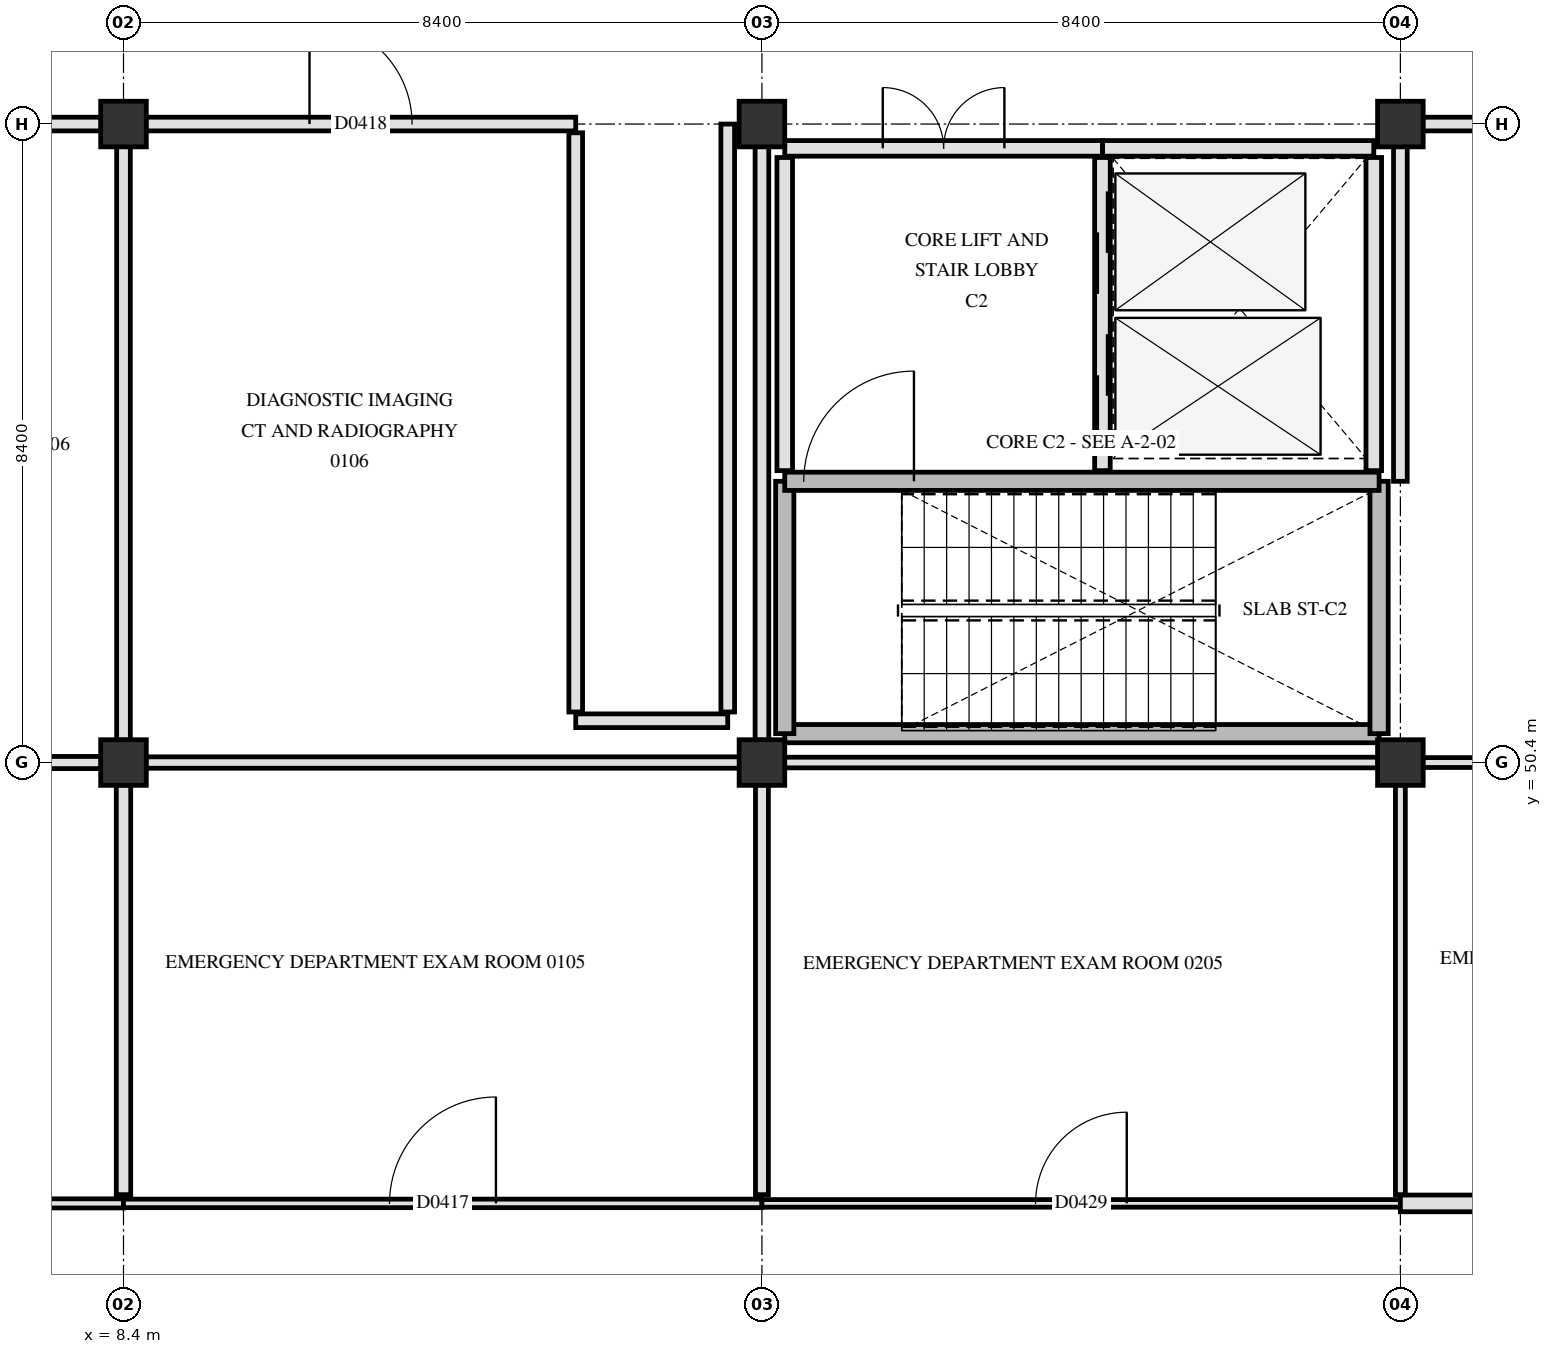
"""IFC4 building model, lengths in metres.
Left out: names, types, materials, properties, quantities, classifications, styles, units other than length and angle.
Written with IfcOpenShell. Run it as: python <this file> out.ifc"""

import sys

from ifc_helpers import new_model, si_unit, direction, frame, frame_2d, origin, origin_2d, place, context, subcontext, project, spatial, rectangle, extrude, element, fill, save


model = new_model("IFC4")
c1 = context("Model", 3, precision=1e-05, world=origin(), true_north=direction((0.0, 1.0)))
c2 = subcontext(c1, "Body", "Model", "MODEL_VIEW")
j1 = project(units=[si_unit("LENGTHUNIT", "METRE"), si_unit("PLANEANGLEUNIT", "RADIAN")], contexts=[c1])
p1 = place(None, origin())
s1 = spatial("IfcSite", under=j1, at=p1, CompositionType="ELEMENT")
p2 = place(p1, origin())
s2 = spatial("IfcBuilding", under=s1, at=p2, CompositionType="ELEMENT")
p3 = place(p2, origin())
s3 = spatial("IfcBuildingStorey", under=s2, at=p3, CompositionType="ELEMENT", Elevation=0.0)
for number, where, z_axis, x_axis in (
    (1, (8.4, 50.4, 0.0), (0.0, 0.0, 1.0), (1.0, 0.0, 0.0)),
    (2, (8.4, 58.8, 0.0), (0.0, 0.0, 1.0), (1.0, 0.0, 0.0)),
    (3, (16.8, 50.4, 0.0), (0.0, 0.0, 1.0), (1.0, 0.0, 0.0)),
    (4, (16.8, 58.8, 0.0), (0.0, 0.0, 1.0), (1.0, 0.0, 0.0)),
    (5, (25.2, 50.4, 0.0), (0.0, 0.0, 1.0), (1.0, 0.0, 0.0)),
    (6, (25.2, 58.8, 0.0), (0.0, 0.0, 1.0), (1.0, 0.0, 0.0)),
):
    element("IfcColumn", number, at=place(p3, frame(where, z_axis=z_axis, x_axis=x_axis)), inside=s3, PredefinedType="COLUMN", context=c2, shape_type="SweptSolid", body=[
        extrude(rectangle(XDim=0.6, YDim=0.6, at=origin_2d()), origin(), (0.0, 0.0, 1.0), 4.8),
    ])
p4 = place(p3, frame((17.1, 50.78, 0.0), z_axis=(0.0, 0.0, 1.0), x_axis=(1.0, 0.0, 0.0)))
e7 = element("IfcWall", 7, at=p4, inside=s3, PredefinedType="SHEAR", context=c2, shape_type="SweptSolid", body=[
    extrude(rectangle(XDim=7.82, YDim=0.24, at=frame_2d((3.91, 0.0))), origin(), (0.0, 0.0, 1.0), 4.5),
])
for number, where, z_axis, x_axis in (
    (8, (17.1, 50.78, 0.0), (0.0, 0.0, 1.0), (0.0, 1.0, 0.0)),
    (9, (24.92, 50.78, 0.0), (0.0, 0.0, 1.0), (0.0, 1.0, 0.0)),
):
    element("IfcWall", number, at=place(p3, frame(where, z_axis=z_axis, x_axis=x_axis)), inside=s3, PredefinedType="SHEAR", context=c2, shape_type="SweptSolid", body=[
        extrude(rectangle(XDim=3.32, YDim=0.24, at=frame_2d((1.66, 0.0))), origin(), (0.0, 0.0, 1.0), 4.5),
    ])
p5 = place(p3, frame((17.1, 54.1, 0.0), z_axis=(0.0, 0.0, 1.0), x_axis=(1.0, 0.0, 0.0)))
e10 = element("IfcWall", 10, at=p5, inside=s3, PredefinedType="SHEAR", context=c2, shape_type="SweptSolid", body=[
    extrude(rectangle(XDim=7.82, YDim=0.24, at=frame_2d((3.91, 0.0))), origin(), (0.0, 0.0, 1.0), 4.5),
])
p6 = place(p5, frame((0.25, 0.0, 0.0)))
e11 = element("IfcOpeningElement", 11, at=p6, cuts=e10, PredefinedType="OPENING", context=c2, shape_type="SweptSolid", body=[
    extrude(rectangle(XDim=1.45, YDim=2.2, at=frame_2d((0.725, 1.1))), frame((0.0, 0.13, 0.0), z_axis=(0.0, -1.0, 0.0), x_axis=(1.0, 0.0, 0.0)), (0.0, 0.0, 1.0), 0.26),
])
p7 = place(p3, frame((21.28, 54.24, 0.0), z_axis=(0.0, 0.0, 1.0), x_axis=(0.0, 1.0, 0.0)))
e12 = element("IfcWall", 12, at=p7, inside=s3, PredefinedType="PARTITIONING", context=c2, shape_type="SweptSolid", body=[
    extrude(rectangle(XDim=4.12, YDim=0.205, at=frame_2d((2.06, 0.0))), origin(), (0.0, 0.0, 1.0), 4.49),
])
p8 = place(p7, frame((0.445, 0.0, 0.0)))
e13 = element("IfcOpeningElement", 13, at=p8, cuts=e12, PredefinedType="OPENING", context=c2, shape_type="SweptSolid", body=[
    extrude(rectangle(XDim=1.35, YDim=2.2, at=frame_2d((0.675, 1.1))), frame((0.0, 0.113, 0.0), z_axis=(0.0, -1.0, 0.0), x_axis=(1.0, 0.0, 0.0)), (0.0, 0.0, 1.0), 0.225),
])
p9 = place(p7, frame((2.325, 0.0, 0.0)))
e14 = element("IfcOpeningElement", 14, at=p9, cuts=e12, PredefinedType="OPENING", context=c2, shape_type="SweptSolid", body=[
    extrude(rectangle(XDim=1.35, YDim=2.2, at=frame_2d((0.675, 1.1))), frame((0.0, 0.113, 0.0), z_axis=(0.0, -1.0, 0.0), x_axis=(1.0, 0.0, 0.0)), (0.0, 0.0, 1.0), 0.225),
])
p10 = place(p3, frame((24.85, 54.24, 0.0), z_axis=(0.0, 0.0, 1.0), x_axis=(0.0, 1.0, 0.0)))
e15 = element("IfcWall", 15, at=p10, inside=s3, PredefinedType="PARTITIONING", context=c2, shape_type="SweptSolid", body=[
    extrude(rectangle(XDim=4.12, YDim=0.205, at=frame_2d((2.06, 0.0))), origin(), (0.0, 0.0, 1.0), 4.49),
])
p11 = place(p3, frame((21.28, 58.48, 0.0), z_axis=(0.0, 0.0, 1.0), x_axis=(1.0, 0.0, 0.0)))
e16 = element("IfcWall", 16, at=p11, inside=s3, PredefinedType="PARTITIONING", context=c2, shape_type="SweptSolid", body=[
    extrude(rectangle(XDim=3.57, YDim=0.205, at=frame_2d((1.785, 0.0))), origin(), (0.0, 0.0, 1.0), 3.84),
])
p12 = place(p3, frame((17.1, 54.24, 0.0), z_axis=(0.0, 0.0, 1.0), x_axis=(0.0, 1.0, 0.0)))
e17 = element("IfcWall", 17, at=p12, inside=s3, PredefinedType="PARTITIONING", context=c2, shape_type="SweptSolid", body=[
    extrude(rectangle(XDim=4.12, YDim=0.205, at=frame_2d((2.06, 0.0))), origin(), (0.0, 0.0, 1.0), 3.89),
])
p13 = place(p3, frame((17.1, 58.48, 0.0), z_axis=(0.0, 0.0, 1.0), x_axis=(1.0, 0.0, 0.0)))
e18 = element("IfcWall", 18, at=p13, inside=s3, PredefinedType="PARTITIONING", context=c2, shape_type="SweptSolid", body=[
    extrude(rectangle(XDim=4.18, YDim=0.205, at=frame_2d((2.09, 0.0))), origin(), (0.0, 0.0, 1.0), 3.84),
])
p14 = place(p13, frame((1.29, 0.0, 0.0)))
e19 = element("IfcOpeningElement", 19, at=p14, cuts=e18, PredefinedType="OPENING", context=c2, shape_type="SweptSolid", body=[
    extrude(rectangle(XDim=1.6, YDim=2.25, at=frame_2d((0.8, 1.125))), frame((0.0, 0.113, 0.0), z_axis=(0.0, -1.0, 0.0), x_axis=(1.0, 0.0, 0.0)), (0.0, 0.0, 1.0), 0.225),
])
p15 = place(p3, frame((0.28, 44.6, 0.0), z_axis=(0.0, 0.0, 1.0), x_axis=(1.0, 0.0, 0.0)))
e20 = element("IfcWall", 20, at=p15, inside=s3, PredefinedType="PARTITIONING", context=c2, shape_type="SweptSolid", body=[
    extrude(rectangle(XDim=8.12, YDim=0.12, at=frame_2d((4.06, 0.0))), origin(), (0.0, 0.0, 1.0), 3.89),
])
p16 = place(p15, frame((3.55, 0.0, 0.0)))
e21 = element("IfcOpeningElement", 21, at=p16, cuts=e20, PredefinedType="OPENING", context=c2, shape_type="SweptSolid", body=[
    extrude(rectangle(XDim=1.02, YDim=2.12, at=frame_2d((0.51, 1.06))), frame((0.0, 0.07, 0.0), z_axis=(0.0, -1.0, 0.0), x_axis=(1.0, 0.0, 0.0)), (0.0, 0.0, 1.0), 0.14),
])
p17 = place(p3, frame((8.4, 44.6, 0.0), z_axis=(0.0, 0.0, 1.0), x_axis=(1.0, 0.0, 0.0)))
e22 = element("IfcWall", 22, at=p17, inside=s3, PredefinedType="PARTITIONING", context=c2, shape_type="SweptSolid", body=[
    extrude(rectangle(XDim=8.4, YDim=0.112, at=frame_2d((4.2, 0.0))), origin(), (0.0, 0.0, 1.0), 3.89),
])
p18 = place(p17, frame((3.5, 0.0, 0.0)))
e23 = element("IfcOpeningElement", 23, at=p18, cuts=e22, PredefinedType="OPENING", context=c2, shape_type="SweptSolid", body=[
    extrude(rectangle(XDim=1.4, YDim=2.2, at=frame_2d((0.7, 1.1))), frame((0.0, 0.066, 0.0), z_axis=(0.0, -1.0, 0.0), x_axis=(1.0, 0.0, 0.0)), (0.0, 0.0, 1.0), 0.132),
])
p19 = place(p3, frame((16.8, 44.6, 0.0), z_axis=(0.0, 0.0, 1.0), x_axis=(1.0, 0.0, 0.0)))
e24 = element("IfcWall", 24, at=p19, inside=s3, PredefinedType="PARTITIONING", context=c2, shape_type="SweptSolid", body=[
    extrude(rectangle(XDim=8.4, YDim=0.1, at=frame_2d((4.2, 0.0))), origin(), (0.0, 0.0, 1.0), 3.89),
])
p20 = place(p19, frame((3.6, 0.0, 0.0)))
e25 = element("IfcOpeningElement", 25, at=p20, cuts=e24, PredefinedType="OPENING", context=c2, shape_type="SweptSolid", body=[
    extrude(rectangle(XDim=1.2, YDim=2.15, at=frame_2d((0.6, 1.075))), frame((0.0, 0.06, 0.0), z_axis=(0.0, -1.0, 0.0), x_axis=(1.0, 0.0, 0.0)), (0.0, 0.0, 1.0), 0.12),
])
p21 = place(p3, frame((25.2, 44.6, 0.0), z_axis=(0.0, 0.0, 1.0), x_axis=(1.0, 0.0, 0.0)))
e26 = element("IfcWall", 26, at=p21, inside=s3, PredefinedType="PARTITIONING", context=c2, shape_type="SweptSolid", body=[
    extrude(rectangle(XDim=8.4, YDim=0.22, at=frame_2d((4.2, 0.0))), origin(), (0.0, 0.0, 1.0), 3.89),
])
p22 = place(p21, frame((3.74, 0.0, 0.0)))
e27 = element("IfcOpeningElement", 27, at=p22, cuts=e26, PredefinedType="OPENING", context=c2, shape_type="SweptSolid", body=[
    extrude(rectangle(XDim=0.92, YDim=2.08, at=frame_2d((0.46, 1.04))), frame((0.0, 0.12, 0.0), z_axis=(0.0, -1.0, 0.0), x_axis=(1.0, 0.0, 0.0)), (0.0, 0.0, 1.0), 0.24),
])
p23 = place(p3, frame((0.295, 50.4, 0.0), z_axis=(0.0, 0.0, 1.0), x_axis=(1.0, 0.0, 0.0)))
e28 = element("IfcWall", 28, at=p23, inside=s3, PredefinedType="PARTITIONING", context=c2, shape_type="SweptSolid", body=[
    extrude(rectangle(XDim=7.81, YDim=0.16, at=frame_2d((3.905, 0.0))), origin(), (0.0, 0.0, 1.0), 3.84),
])
p24 = place(p3, frame((8.695, 50.4, 0.0), z_axis=(0.0, 0.0, 1.0), x_axis=(1.0, 0.0, 0.0)))
e29 = element("IfcWall", 29, at=p24, inside=s3, PredefinedType="PARTITIONING", context=c2, shape_type="SweptSolid", body=[
    extrude(rectangle(XDim=7.81, YDim=0.15, at=frame_2d((3.905, 0.0))), origin(), (0.0, 0.0, 1.0), 3.84),
])
p25 = place(p3, frame((17.095, 50.4, 0.0), z_axis=(0.0, 0.0, 1.0), x_axis=(1.0, 0.0, 0.0)))
e30 = element("IfcWall", 30, at=p25, inside=s3, PredefinedType="PARTITIONING", context=c2, shape_type="SweptSolid", body=[
    extrude(rectangle(XDim=7.81, YDim=0.14, at=frame_2d((3.905, 0.0))), origin(), (0.0, 0.0, 1.0), 3.84),
])
p26 = place(p3, frame((25.495, 50.4, 0.0), z_axis=(0.0, 0.0, 1.0), x_axis=(1.0, 0.0, 0.0)))
e31 = element("IfcWall", 31, at=p26, inside=s3, PredefinedType="PARTITIONING", context=c2, shape_type="SweptSolid", body=[
    extrude(rectangle(XDim=7.81, YDim=0.13, at=frame_2d((3.905, 0.0))), origin(), (0.0, 0.0, 1.0), 3.84),
])
p27 = place(p3, frame((14.35, 50.95, 0.0), z_axis=(0.0, 0.0, 1.0), x_axis=(1.0, 0.0, 0.0)))
e32 = element("IfcWall", 32, at=p27, inside=s3, PredefinedType="PARTITIONING", context=c2, shape_type="SweptSolid", body=[
    extrude(rectangle(XDim=2.0, YDim=0.18, at=frame_2d((1.0, 0.0))), origin(), (0.0, 0.0, 1.0), 4.49),
])
p28 = place(p3, frame((0.295, 58.8, 0.0), z_axis=(0.0, 0.0, 1.0), x_axis=(1.0, 0.0, 0.0)))
e33 = element("IfcWall", 33, at=p28, inside=s3, PredefinedType="PARTITIONING", context=c2, shape_type="SweptSolid", body=[
    extrude(rectangle(XDim=7.81, YDim=0.18, at=frame_2d((3.905, 0.0))), origin(), (0.0, 0.0, 1.0), 3.84),
])
p29 = place(p28, frame((3.365, 0.0, 0.0)))
e34 = element("IfcOpeningElement", 34, at=p29, cuts=e33, PredefinedType="OPENING", context=c2, shape_type="SweptSolid", body=[
    extrude(rectangle(XDim=1.08, YDim=2.12, at=frame_2d((0.54, 1.06))), frame((0.0, 0.1, 0.0), z_axis=(0.0, -1.0, 0.0), x_axis=(1.0, 0.0, 0.0)), (0.0, 0.0, 1.0), 0.2),
])
p30 = place(p3, frame((8.695, 58.8, 0.0), z_axis=(0.0, 0.0, 1.0), x_axis=(1.0, 0.0, 0.0)))
e35 = element("IfcWall", 35, at=p30, inside=s3, PredefinedType="PARTITIONING", context=c2, shape_type="SweptSolid", body=[
    extrude(rectangle(XDim=5.655, YDim=0.18, at=frame_2d((2.828, 0.0))), origin(), (0.0, 0.0, 1.0), 3.84),
])
p31 = place(p30, frame((2.153, 0.0, 0.0)))
e36 = element("IfcOpeningElement", 36, at=p31, cuts=e35, PredefinedType="OPENING", context=c2, shape_type="SweptSolid", body=[
    extrude(rectangle(XDim=1.35, YDim=2.2, at=frame_2d((0.675, 1.1))), frame((0.0, 0.1, 0.0), z_axis=(0.0, -1.0, 0.0), x_axis=(1.0, 0.0, 0.0)), (0.0, 0.0, 1.0), 0.2),
])
p32 = place(p3, frame((25.495, 58.8, 0.0), z_axis=(0.0, 0.0, 1.0), x_axis=(1.0, 0.0, 0.0)))
e37 = element("IfcWall", 37, at=p32, inside=s3, PredefinedType="PARTITIONING", context=c2, shape_type="SweptSolid", body=[
    extrude(rectangle(XDim=7.81, YDim=0.18, at=frame_2d((3.905, 0.0))), origin(), (0.0, 0.0, 1.0), 3.84),
])
p33 = place(p32, frame((3.415, 0.0, 0.0)))
e38 = element("IfcOpeningElement", 38, at=p33, cuts=e37, PredefinedType="OPENING", context=c2, shape_type="SweptSolid", body=[
    extrude(rectangle(XDim=0.98, YDim=2.12, at=frame_2d((0.49, 1.06))), frame((0.0, 0.1, 0.0), z_axis=(0.0, -1.0, 0.0), x_axis=(1.0, 0.0, 0.0)), (0.0, 0.0, 1.0), 0.2),
])
p34 = place(p3, frame((8.4, 44.715, 0.0), z_axis=(0.0, 0.0, 1.0), x_axis=(0.0, 1.0, 0.0)))
e39 = element("IfcWall", 39, at=p34, inside=s3, PredefinedType="PARTITIONING", context=c2, shape_type="SweptSolid", body=[
    extrude(rectangle(XDim=5.39, YDim=0.19, at=frame_2d((2.695, 0.0))), origin(), (0.0, 0.0, 1.0), 3.89),
])
p35 = place(p3, frame((8.4, 50.695, 0.0), z_axis=(0.0, 0.0, 1.0), x_axis=(0.0, 1.0, 0.0)))
e40 = element("IfcWall", 40, at=p35, inside=s3, PredefinedType="PARTITIONING", context=c2, shape_type="SweptSolid", body=[
    extrude(rectangle(XDim=7.81, YDim=0.18, at=frame_2d((3.905, 0.0))), origin(), (0.0, 0.0, 1.0), 3.89),
])
p36 = place(p3, frame((14.35, 51.065, 0.0), z_axis=(0.0, 0.0, 1.0), x_axis=(0.0, 1.0, 0.0)))
e41 = element("IfcWall", 41, at=p36, inside=s3, PredefinedType="PARTITIONING", context=c2, shape_type="SweptSolid", body=[
    extrude(rectangle(XDim=7.62, YDim=0.18, at=frame_2d((3.81, 0.0))), origin(), (0.0, 0.0, 1.0), 3.84),
])
p37 = place(p3, frame((16.35, 51.065, 0.0), z_axis=(0.0, 0.0, 1.0), x_axis=(0.0, 1.0, 0.0)))
e42 = element("IfcWall", 42, at=p37, inside=s3, PredefinedType="PARTITIONING", context=c2, shape_type="SweptSolid", body=[
    extrude(rectangle(XDim=7.735, YDim=0.18, at=frame_2d((3.868, 0.0))), origin(), (0.0, 0.0, 1.0), 3.84),
])
p38 = place(p3, frame((16.8, 44.715, 0.0), z_axis=(0.0, 0.0, 1.0), x_axis=(0.0, 1.0, 0.0)))
e43 = element("IfcWall", 43, at=p38, inside=s3, PredefinedType="PARTITIONING", context=c2, shape_type="SweptSolid", body=[
    extrude(rectangle(XDim=5.39, YDim=0.17, at=frame_2d((2.695, 0.0))), origin(), (0.0, 0.0, 1.0), 3.89),
])
p39 = place(p3, frame((16.8, 50.695, 0.0), z_axis=(0.0, 0.0, 1.0), x_axis=(0.0, 1.0, 0.0)))
e44 = element("IfcWall", 44, at=p39, inside=s3, PredefinedType="PARTITIONING", context=c2, shape_type="SweptSolid", body=[
    extrude(rectangle(XDim=7.81, YDim=0.18, at=frame_2d((3.905, 0.0))), origin(), (0.0, 0.0, 1.0), 3.89),
])
p40 = place(p3, frame((25.2, 44.715, 0.0), z_axis=(0.0, 0.0, 1.0), x_axis=(0.0, 1.0, 0.0)))
e45 = element("IfcWall", 45, at=p40, inside=s3, PredefinedType="PARTITIONING", context=c2, shape_type="SweptSolid", body=[
    extrude(rectangle(XDim=5.39, YDim=0.13, at=frame_2d((2.695, 0.0))), origin(), (0.0, 0.0, 1.0), 3.89),
])
p41 = place(p3, frame((25.2, 54.1, 0.0), z_axis=(0.0, 0.0, 1.0), x_axis=(0.0, 1.0, 0.0)))
e46 = element("IfcWall", 46, at=p41, inside=s3, PredefinedType="PARTITIONING", context=c2, shape_type="SweptSolid", body=[
    extrude(rectangle(XDim=4.405, YDim=0.18, at=frame_2d((2.202, 0.0))), origin(), (0.0, 0.0, 1.0), 3.89),
])
p42 = place(p6, origin())
e47 = element("IfcDoor", 47, at=p42, inside=s3, OperationType="SINGLE_SWING_RIGHT", PredefinedType="DOOR", context=c2, shape_type="SweptSolid", body=[
    extrude(rectangle(XDim=1.45, YDim=2.2, at=frame_2d((0.725, 1.1))), frame((0.0, 0.025, 0.0), z_axis=(0.0, -1.0, 0.0), x_axis=(1.0, 0.0, 0.0)), (0.0, 0.0, 1.0), 0.05),
])
fill(e11, e47)
p43 = place(p8, origin())
e48 = element("IfcDoor", 48, at=p43, inside=s3, OperationType="SLIDING_TO_LEFT", PredefinedType="DOOR", context=c2, shape_type="SweptSolid", body=[
    extrude(rectangle(XDim=1.35, YDim=2.2, at=frame_2d((0.675, 1.1))), frame((0.0, 0.025, 0.0), z_axis=(0.0, -1.0, 0.0), x_axis=(1.0, 0.0, 0.0)), (0.0, 0.0, 1.0), 0.05),
])
fill(e13, e48)
p44 = place(p9, origin())
e49 = element("IfcDoor", 49, at=p44, inside=s3, OperationType="SLIDING_TO_LEFT", PredefinedType="DOOR", context=c2, shape_type="SweptSolid", body=[
    extrude(rectangle(XDim=1.35, YDim=2.2, at=frame_2d((0.675, 1.1))), frame((0.0, 0.025, 0.0), z_axis=(0.0, -1.0, 0.0), x_axis=(1.0, 0.0, 0.0)), (0.0, 0.0, 1.0), 0.05),
])
fill(e14, e49)
p45 = place(p14, origin())
e50 = element("IfcDoor", 50, at=p45, inside=s3, OperationType="DOUBLE_SWING_LEFT", PredefinedType="DOOR", context=c2, shape_type="SweptSolid", body=[
    extrude(rectangle(XDim=1.6, YDim=2.25, at=frame_2d((0.8, 1.125))), frame((0.0, 0.025, 0.0), z_axis=(0.0, -1.0, 0.0), x_axis=(1.0, 0.0, 0.0)), (0.0, 0.0, 1.0), 0.05),
])
fill(e19, e50)
p46 = place(p18, origin())
e51 = element("IfcDoor", 51, at=p46, inside=s3, OperationType="SINGLE_SWING_RIGHT", PredefinedType="DOOR", context=c2, shape_type="SweptSolid", body=[
    extrude(rectangle(XDim=1.4, YDim=2.2, at=frame_2d((0.7, 1.1))), frame((0.0, 0.025, 0.0), z_axis=(0.0, -1.0, 0.0), x_axis=(1.0, 0.0, 0.0)), (0.0, 0.0, 1.0), 0.05),
])
fill(e23, e51)
p47 = place(p31, origin())
e52 = element("IfcDoor", 52, at=p47, inside=s3, OperationType="SINGLE_SWING_LEFT", PredefinedType="DOOR", context=c2, shape_type="SweptSolid", body=[
    extrude(rectangle(XDim=1.35, YDim=2.2, at=frame_2d((0.675, 1.1))), frame((0.0, 0.025, 0.0), z_axis=(0.0, -1.0, 0.0), x_axis=(1.0, 0.0, 0.0)), (0.0, 0.0, 1.0), 0.05),
])
fill(e36, e52)
p48 = place(p20, origin())
e53 = element("IfcDoor", 53, at=p48, inside=s3, OperationType="SINGLE_SWING_RIGHT", PredefinedType="DOOR", context=c2, shape_type="SweptSolid", body=[
    extrude(rectangle(XDim=1.2, YDim=2.15, at=frame_2d((0.6, 1.075))), frame((0.0, 0.025, 0.0), z_axis=(0.0, -1.0, 0.0), x_axis=(1.0, 0.0, 0.0)), (0.0, 0.0, 1.0), 0.05),
])
fill(e25, e53)
save(model, sys.argv[1])
